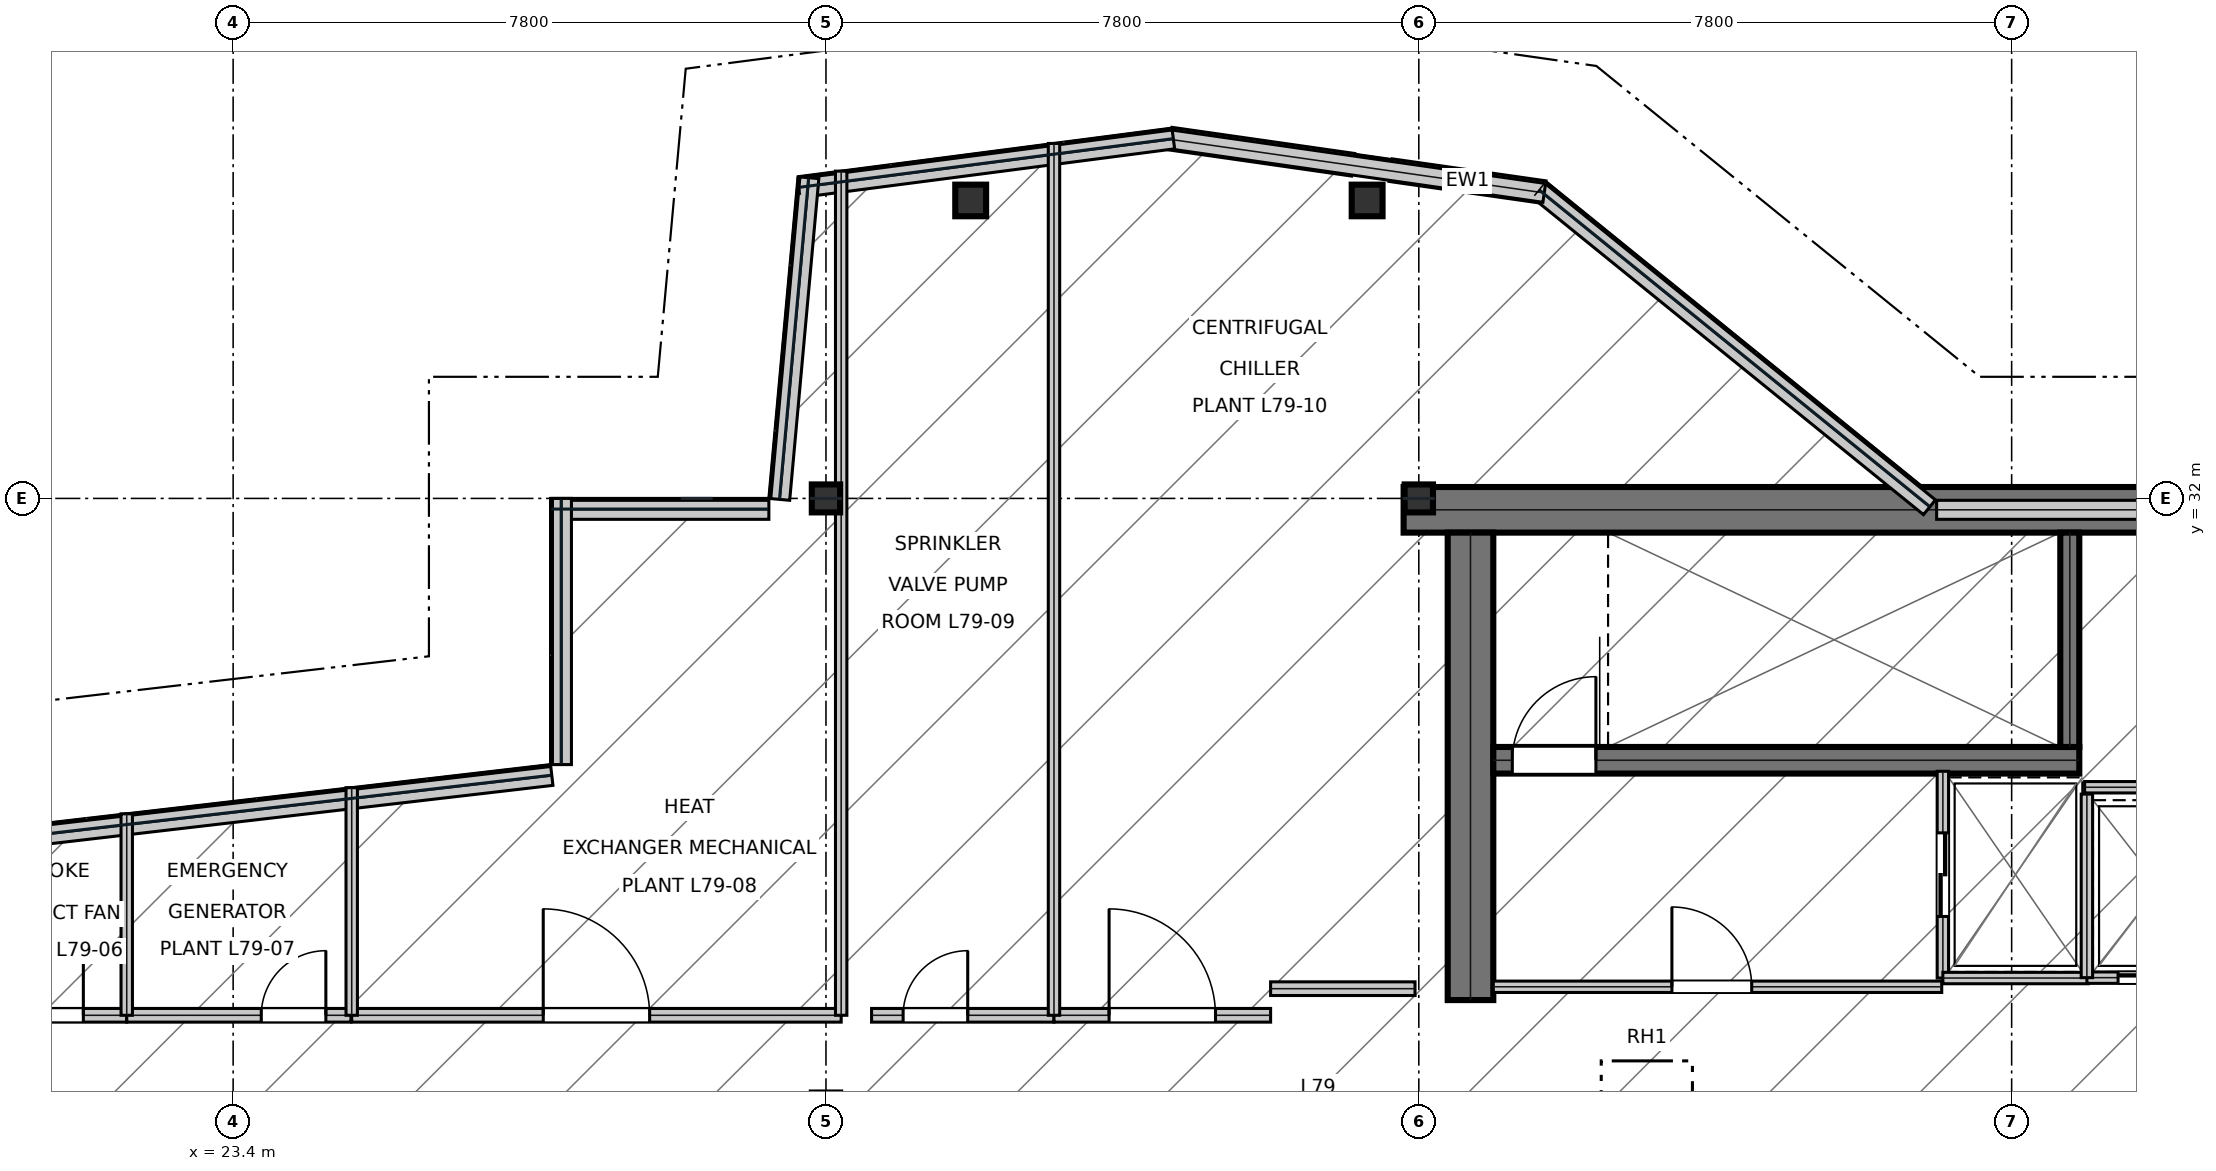
"""IFC4 building model, lengths in metres.
Left out: names, types, materials, properties, quantities, classifications, styles, units other than length and angle.
Written with IfcOpenShell. Run it as: python <this file> out.ifc"""

import sys

from ifc_helpers import new_model, si_unit, direction, frame, frame_2d, origin, origin_2d, place, context, subcontext, project, spatial, rectangle, i_section, extrude, element, fill, save


model = new_model("IFC4")
c1 = context("Model", 3, precision=1e-05, world=origin(), true_north=direction((0.0, 1.0)))
c2 = subcontext(c1, "Body", "Model", "MODEL_VIEW")
j1 = project(units=[si_unit("LENGTHUNIT", "METRE"), si_unit("PLANEANGLEUNIT", "RADIAN")], contexts=[c1])
p1 = place(None, origin())
s1 = spatial("IfcSite", under=j1, at=p1, CompositionType="ELEMENT")
p2 = place(p1, origin())
s2 = spatial("IfcBuilding", under=s1, at=p2, CompositionType="ELEMENT")
p3 = place(p2, frame((0.0, 0.0, 336.9)))
s3 = spatial("IfcBuildingStorey", under=s2, at=p3, CompositionType="ELEMENT", Elevation=336.9)
p4 = place(p3, frame((38.8, 31.85, 0.0), z_axis=(0.0, 0.0, 1.0), x_axis=(1.0, 0.0, 0.0)))
e1 = element("IfcWall", 1, at=p4, inside=s3, PredefinedType="SHEAR", context=c2, shape_type="SweptSolid", body=[
    extrude(rectangle(XDim=16.0, YDim=0.6, at=frame_2d((8.0, 0.0))), origin(), (0.0, 0.0, 1.0), 4.22),
])
p5 = place(p3, frame((39.68, 25.4, 0.0), z_axis=(0.0, 0.0, 1.0), x_axis=(0.0, 1.0, 0.0)))
e2 = element("IfcWall", 2, at=p5, inside=s3, PredefinedType="SHEAR", context=c2, shape_type="SweptSolid", body=[
    extrude(rectangle(XDim=6.15, YDim=0.6, at=frame_2d((3.075, 0.0))), origin(), (0.0, 0.0, 1.0), 4.22),
])
p6 = place(p3, frame((39.98, 28.555, 0.0), z_axis=(0.0, 0.0, 1.0), x_axis=(1.0, 0.0, 0.0)))
e3 = element("IfcWall", 3, at=p6, inside=s3, PredefinedType="SHEAR", context=c2, shape_type="SweptSolid", body=[
    extrude(rectangle(XDim=7.71, YDim=0.35, at=frame_2d((3.855, 0.0))), origin(), (0.0, 0.0, 1.0), 4.22),
])
p7 = place(p6, frame((0.25, 0.0, 0.0)))
e4 = element("IfcOpeningElement", 4, at=p7, cuts=e3, PredefinedType="OPENING", context=c2, shape_type="SweptSolid", body=[
    extrude(rectangle(XDim=1.1, YDim=2.15, at=frame_2d((0.55, 1.075))), frame((0.0, 0.185, 0.0), z_axis=(0.0, -1.0, 0.0), x_axis=(1.0, 0.0, 0.0)), (0.0, 0.0, 1.0), 0.37),
])
p8 = place(p3, frame((47.565, 28.73, 0.0), z_axis=(0.0, 0.0, 1.0), x_axis=(0.0, 1.0, 0.0)))
e5 = element("IfcWall", 5, at=p8, inside=s3, PredefinedType="SHEAR", context=c2, shape_type="SweptSolid", body=[
    extrude(rectangle(XDim=2.82, YDim=0.25, at=frame_2d((1.41, 0.0))), origin(), (0.0, 0.0, 1.0), 4.22),
])
for number, where, z_axis, x_axis in (
    (6, (31.2, 32.0, 0.0), (0.0, 0.0, 1.0), (1.0, 0.0, 0.0)),
    (7, (39.0, 32.0, 0.0), (0.0, 0.0, 1.0), (1.0, 0.0, 0.0)),
):
    element("IfcColumn", number, at=place(p3, frame(where, z_axis=z_axis, x_axis=x_axis)), inside=s3, PredefinedType="COLUMN", context=c2, shape_type="SweptSolid", body=[
        extrude(i_section(OverallWidth=0.373, OverallDepth=0.368, WebThickness=0.015, FlangeThickness=0.024, at=origin_2d()), origin(), (0.0, 0.0, 1.0), 4.444),
    ])
for number, where, z_axis, x_axis in (
    (8, (33.104, 35.92, 0.016), (0.0, 0.0, 1.0), (1.0, 0.0, 0.0)),
    (9, (38.32, 35.92, 0.016), (0.0, 0.0, 1.0), (1.0, 0.0, 0.0)),
):
    element("IfcColumn", number, at=place(p3, frame(where, z_axis=z_axis, x_axis=x_axis)), inside=s3, PredefinedType="COLUMN", context=c2, shape_type="SweptSolid", body=[
        extrude(i_section(OverallWidth=0.406, OverallDepth=0.416, WebThickness=0.03, FlangeThickness=0.048, at=origin_2d()), origin(), (0.0, 0.0, 1.0), 4.418),
    ])
p9 = place(p3, frame((40.652, 36.029, 0.0), z_axis=(0.0, 0.0, 1.0), x_axis=(-0.989904067126, 0.141738978007, 0.0)))
e10 = element("IfcWall", 10, at=p9, inside=s3, PredefinedType="STANDARD", context=c2, shape_type="SweptSolid", body=[
    extrude(rectangle(XDim=2.045, YDim=0.3, at=frame_2d((1.022, 0.0))), origin(), (0.0, 0.0, 1.0), 4.17),
])
p10 = place(p3, frame((38.136, 36.389, 0.0), z_axis=(0.0, 0.0, 1.0), x_axis=(-0.989917298502, 0.141646539412, 0.0)))
e11 = element("IfcWall", 11, at=p10, inside=s3, PredefinedType="STANDARD", context=c2, shape_type="SweptSolid", body=[
    extrude(rectangle(XDim=2.428, YDim=0.3, at=frame_2d((1.214, 0.0))), origin(), (0.0, 0.0, 1.0), 4.17),
])
p11 = place(p3, frame((54.6, 31.85, 4.45), z_axis=(0.0, 0.0, 1.0), x_axis=(-1.0, 0.0, 0.0)))
e12 = element("IfcWall", 12, at=p11, inside=s3, PredefinedType="PARAPET", context=c2, shape_type="SweptSolid", body=[
    extrude(rectangle(XDim=8.787, YDim=0.25, at=frame_2d((4.394, 0.0))), origin(), (0.0, 0.0, 1.0), 1.1),
])
p12 = place(p3, frame((45.719, 31.884, 4.45), z_axis=(0.0, 0.0, 1.0), x_axis=(-0.77680744345, 0.629738196238, 0.0)))
e13 = element("IfcWall", 13, at=p12, inside=s3, PredefinedType="PARAPET", context=c2, shape_type="SweptSolid", body=[
    extrude(rectangle(XDim=6.619, YDim=0.25, at=frame_2d((3.309, 0.0))), origin(), (0.0, 0.0, 1.0), 1.1),
])
p13 = place(p3, frame((40.65, 36.02, 4.45), z_axis=(0.0, 0.0, 1.0), x_axis=(-0.989919997097, 0.141627678608, 0.0)))
e14 = element("IfcWall", 14, at=p13, inside=s3, PredefinedType="PARAPET", context=c2, shape_type="SweptSolid", body=[
    extrude(rectangle(XDim=4.97, YDim=0.25, at=frame_2d((2.485, 0.0))), origin(), (0.0, 0.0, 1.0), 1.1),
])
p14 = place(p3, frame((35.771, 36.723, 4.45), z_axis=(0.0, 0.0, 1.0), x_axis=(-0.991640700932, -0.129029919996, 0.0)))
e15 = element("IfcWall", 15, at=p14, inside=s3, PredefinedType="PARAPET", context=c2, shape_type="SweptSolid", body=[
    extrude(rectangle(XDim=4.961, YDim=0.25, at=frame_2d((2.48, 0.0))), origin(), (0.0, 0.0, 1.0), 1.1),
])
p15 = place(p3, frame((30.982, 36.219, 4.45), z_axis=(0.0, 0.0, 1.0), x_axis=(-0.090318171013, -0.995912962053, 0.0)))
e16 = element("IfcWall", 16, at=p15, inside=s3, PredefinedType="PARAPET", context=c2, shape_type="SweptSolid", body=[
    extrude(rectangle(XDim=4.249, YDim=0.25, at=frame_2d((2.125, 0.0))), origin(), (0.0, 0.0, 1.0), 1.1),
])
p16 = place(p3, frame((30.448, 31.85, 4.45), z_axis=(0.0, 0.0, 1.0), x_axis=(-1.0, 0.0, 0.0)))
e17 = element("IfcWall", 17, at=p16, inside=s3, PredefinedType="PARAPET", context=c2, shape_type="SweptSolid", body=[
    extrude(rectangle(XDim=2.873, YDim=0.25, at=frame_2d((1.436, 0.0))), origin(), (0.0, 0.0, 1.0), 1.1),
])
p17 = place(p3, frame((27.726, 32.0, 4.45), z_axis=(0.0, 0.0, 1.0), x_axis=(0.0, -1.0, 0.0)))
e18 = element("IfcWall", 18, at=p17, inside=s3, PredefinedType="PARAPET", context=c2, shape_type="SweptSolid", body=[
    extrude(rectangle(XDim=3.502, YDim=0.25, at=frame_2d((1.751, 0.0))), origin(), (0.0, 0.0, 1.0), 1.1),
])
p18 = place(p3, frame((27.593, 28.349, 4.45), z_axis=(0.0, 0.0, 1.0), x_axis=(-0.993323430456, -0.115362743148, 0.0)))
e19 = element("IfcWall", 19, at=p18, inside=s3, PredefinedType="PARAPET", context=c2, shape_type="SweptSolid", body=[
    extrude(rectangle(XDim=7.828, YDim=0.25, at=frame_2d((3.914, 0.0))), origin(), (0.0, 0.0, 1.0), 1.1),
])
p19 = place(p3, frame((39.98, 25.575, 0.0), z_axis=(0.0, 0.0, 1.0), x_axis=(1.0, 0.0, 0.0)))
e20 = element("IfcWall", 20, at=p19, inside=s3, PredefinedType="PARTITIONING", context=c2, shape_type="SweptSolid", body=[
    extrude(rectangle(XDim=5.9, YDim=0.15, at=frame_2d((2.95, 0.0))), origin(), (0.0, 0.0, 1.0), 4.22),
])
p20 = place(p19, frame((2.35, 0.0, 0.0)))
e21 = element("IfcOpeningElement", 21, at=p20, cuts=e20, PredefinedType="OPENING", context=c2, shape_type="SweptSolid", body=[
    extrude(rectangle(XDim=1.05, YDim=2.15, at=frame_2d((0.525, 1.075))), frame((0.0, 0.085, 0.0), z_axis=(0.0, -1.0, 0.0), x_axis=(1.0, 0.0, 0.0)), (0.0, 0.0, 1.0), 0.17),
])
p21 = place(p3, frame((45.895, 25.69, 0.0), z_axis=(0.0, 0.0, 1.0), x_axis=(0.0, 1.0, 0.0)))
e22 = element("IfcWall", 22, at=p21, inside=s3, PredefinedType="PARTITIONING", context=c2, shape_type="SweptSolid", body=[
    extrude(rectangle(XDim=2.72, YDim=0.15, at=frame_2d((1.36, 0.0))), origin(), (0.0, 0.0, 1.0), 4.22),
])
p22 = place(p21, frame((0.81, 0.0, 0.0)))
e23 = element("IfcOpeningElement", 23, at=p22, cuts=e22, PredefinedType="OPENING", context=c2, shape_type="SweptSolid", body=[
    extrude(rectangle(XDim=1.1, YDim=2.15, at=frame_2d((0.55, 1.075))), frame((0.0, 0.085, 0.0), z_axis=(0.0, -1.0, 0.0), x_axis=(1.0, 0.0, 0.0)), (0.0, 0.0, 1.0), 0.17),
])
p23 = place(p3, frame((45.895, 25.69, 0.0), z_axis=(0.0, 0.0, 1.0), x_axis=(1.0, 0.0, 0.0)))
e24 = element("IfcWall", 24, at=p23, inside=s3, PredefinedType="PARTITIONING", context=c2, shape_type="SweptSolid", body=[
    extrude(rectangle(XDim=1.915, YDim=0.15, at=frame_2d((0.958, 0.0))), origin(), (0.0, 0.0, 1.0), 4.22),
])
p24 = place(p3, frame((47.79, 25.695, 0.0), z_axis=(0.0, 0.0, 1.0), x_axis=(1.0, 0.0, 0.0)))
e25 = element("IfcWall", 25, at=p24, inside=s3, PredefinedType="PARTITIONING", context=c2, shape_type="SweptSolid", body=[
    extrude(rectangle(XDim=1.92, YDim=0.15, at=frame_2d((0.96, 0.0))), origin(), (0.0, 0.0, 1.0), 4.22),
])
p25 = place(p24, frame((0.41, 0.0, 0.0)))
e26 = element("IfcOpeningElement", 26, at=p25, cuts=e25, PredefinedType="OPENING", context=c2, shape_type="SweptSolid", body=[
    extrude(rectangle(XDim=1.1, YDim=2.15, at=frame_2d((0.55, 1.075))), frame((0.0, 0.085, 0.0), z_axis=(0.0, -1.0, 0.0), x_axis=(1.0, 0.0, 0.0)), (0.0, 0.0, 1.0), 0.17),
])
p26 = place(p3, frame((47.79, 25.695, 0.0), z_axis=(0.0, 0.0, 1.0), x_axis=(0.0, 1.0, 0.0)))
e27 = element("IfcWall", 27, at=p26, inside=s3, PredefinedType="PARTITIONING", context=c2, shape_type="SweptSolid", body=[
    extrude(rectangle(XDim=2.415, YDim=0.15, at=frame_2d((1.208, 0.0))), origin(), (0.0, 0.0, 1.0), 4.22),
])
p27 = place(p3, frame((47.76, 28.2, 0.0), z_axis=(0.0, 0.0, 1.0), x_axis=(1.0, 0.0, 0.0)))
e28 = element("IfcWall", 28, at=p27, inside=s3, PredefinedType="PARTITIONING", context=c2, shape_type="SweptSolid", body=[
    extrude(rectangle(XDim=2.04, YDim=0.15, at=frame_2d((1.02, 0.0))), origin(), (0.0, 0.0, 1.0), 4.22),
])
p28 = place(p3, frame((19.288, 25.2, 0.0), z_axis=(0.0, 0.0, 1.0), x_axis=(1.0, 0.0, 0.0)))
e29 = element("IfcWall", 29, at=p28, inside=s3, PredefinedType="SOLIDWALL", context=c2, shape_type="SweptSolid", body=[
    extrude(rectangle(XDim=2.712, YDim=0.18, at=frame_2d((1.356, 0.0))), origin(), (0.0, 0.0, 1.0), 4.22),
])
p29 = place(p28, frame((1.291, 0.0, 0.0)))
e30 = element("IfcOpeningElement", 30, at=p29, cuts=e29, PredefinedType="OPENING", context=c2, shape_type="SweptSolid", body=[
    extrude(rectangle(XDim=0.85, YDim=2.15, at=frame_2d((0.425, 1.075))), frame((0.0, 0.1, 0.0), z_axis=(0.0, -1.0, 0.0), x_axis=(1.0, 0.0, 0.0)), (0.0, 0.0, 1.0), 0.2),
])
p30 = place(p3, frame((22.0, 25.2, 0.0), z_axis=(0.0, 0.0, 1.0), x_axis=(1.0, 0.0, 0.0)))
e31 = element("IfcWall", 31, at=p30, inside=s3, PredefinedType="SOLIDWALL", context=c2, shape_type="SweptSolid", body=[
    extrude(rectangle(XDim=2.95, YDim=0.18, at=frame_2d((1.475, 0.0))), origin(), (0.0, 0.0, 1.0), 3.63),
])
p31 = place(p30, frame((1.77, 0.0, 0.0)))
e32 = element("IfcOpeningElement", 32, at=p31, cuts=e31, PredefinedType="OPENING", context=c2, shape_type="SweptSolid", body=[
    extrude(rectangle(XDim=0.85, YDim=2.15, at=frame_2d((0.425, 1.075))), frame((0.0, 0.1, 0.0), z_axis=(0.0, -1.0, 0.0), x_axis=(1.0, 0.0, 0.0)), (0.0, 0.0, 1.0), 0.2),
])
p32 = place(p3, frame((24.96, 25.2, 0.0), z_axis=(0.0, 0.0, 1.0), x_axis=(1.0, 0.0, 0.0)))
e33 = element("IfcWall", 33, at=p32, inside=s3, PredefinedType="SOLIDWALL", context=c2, shape_type="SweptSolid", body=[
    extrude(rectangle(XDim=6.44, YDim=0.18, at=frame_2d((3.22, 0.0))), origin(), (0.0, 0.0, 1.0), 3.63),
])
p33 = place(p32, frame((2.52, 0.0, 0.0)))
e34 = element("IfcOpeningElement", 34, at=p33, cuts=e33, PredefinedType="OPENING", context=c2, shape_type="SweptSolid", body=[
    extrude(rectangle(XDim=1.4, YDim=2.2, at=frame_2d((0.7, 1.1))), frame((0.0, 0.1, 0.0), z_axis=(0.0, -1.0, 0.0), x_axis=(1.0, 0.0, 0.0)), (0.0, 0.0, 1.0), 0.2),
])
p34 = place(p3, frame((31.8, 25.2, 0.0), z_axis=(0.0, 0.0, 1.0), x_axis=(1.0, 0.0, 0.0)))
e35 = element("IfcWall", 35, at=p34, inside=s3, PredefinedType="SOLIDWALL", context=c2, shape_type="SweptSolid", body=[
    extrude(rectangle(XDim=2.4, YDim=0.18, at=frame_2d((1.2, 0.0))), origin(), (0.0, 0.0, 1.0), 4.22),
])
p35 = place(p34, frame((0.415, 0.0, 0.0)))
e36 = element("IfcOpeningElement", 36, at=p35, cuts=e35, PredefinedType="OPENING", context=c2, shape_type="SweptSolid", body=[
    extrude(rectangle(XDim=0.85, YDim=2.15, at=frame_2d((0.425, 1.075))), frame((0.0, 0.1, 0.0), z_axis=(0.0, -1.0, 0.0), x_axis=(1.0, 0.0, 0.0)), (0.0, 0.0, 1.0), 0.2),
])
p36 = place(p3, frame((34.2, 25.2, 0.0), z_axis=(0.0, 0.0, 1.0), x_axis=(1.0, 0.0, 0.0)))
e37 = element("IfcWall", 37, at=p36, inside=s3, PredefinedType="SOLIDWALL", context=c2, shape_type="SweptSolid", body=[
    extrude(rectangle(XDim=2.85, YDim=0.18, at=frame_2d((1.425, 0.0))), origin(), (0.0, 0.0, 1.0), 4.22),
])
p37 = place(p36, frame((0.725, 0.0, 0.0)))
e38 = element("IfcOpeningElement", 38, at=p37, cuts=e37, PredefinedType="OPENING", context=c2, shape_type="SweptSolid", body=[
    extrude(rectangle(XDim=1.4, YDim=2.2, at=frame_2d((0.7, 1.1))), frame((0.0, 0.1, 0.0), z_axis=(0.0, -1.0, 0.0), x_axis=(1.0, 0.0, 0.0)), (0.0, 0.0, 1.0), 0.2),
])
p38 = place(p3, frame((37.05, 25.55, 0.0), z_axis=(0.0, 0.0, 1.0), x_axis=(1.0, 0.0, 0.0)))
e39 = element("IfcWall", 39, at=p38, inside=s3, PredefinedType="SOLIDWALL", context=c2, shape_type="SweptSolid", body=[
    extrude(rectangle(XDim=1.9, YDim=0.18, at=frame_2d((0.95, 0.0))), origin(), (0.0, 0.0, 1.0), 4.22),
])
p39 = place(p3, frame((22.0, 25.2, 0.0), z_axis=(0.0, 0.0, 1.0), x_axis=(0.0, 1.0, 0.0)))
e40 = element("IfcWall", 40, at=p39, inside=s3, PredefinedType="MOVABLE", context=c2, shape_type="SweptSolid", body=[
    extrude(rectangle(XDim=2.651, YDim=0.15, at=frame_2d((1.325, 0.0))), origin(), (0.0, 0.0, 1.0), 3.63),
])
p40 = place(p3, frame((24.96, 25.2, 0.0), z_axis=(0.0, 0.0, 1.0), x_axis=(0.0, 1.0, 0.0)))
e41 = element("IfcWall", 41, at=p40, inside=s3, PredefinedType="MOVABLE", context=c2, shape_type="SweptSolid", body=[
    extrude(rectangle(XDim=2.994, YDim=0.15, at=frame_2d((1.497, 0.0))), origin(), (0.0, 0.0, 1.0), 3.63),
])
p41 = place(p3, frame((31.4, 25.2, 0.0), z_axis=(0.0, 0.0, 1.0), x_axis=(0.0, 1.0, 0.0)))
e42 = element("IfcWall", 42, at=p41, inside=s3, PredefinedType="MOVABLE", context=c2, shape_type="SweptSolid", body=[
    extrude(rectangle(XDim=11.106, YDim=0.15, at=frame_2d((5.553, 0.0))), origin(), (0.0, 0.0, 1.0), 3.63),
])
p42 = place(p3, frame((34.2, 25.2, 0.0), z_axis=(0.0, 0.0, 1.0), x_axis=(0.0, 1.0, 0.0)))
e43 = element("IfcWall", 43, at=p42, inside=s3, PredefinedType="MOVABLE", context=c2, shape_type="SweptSolid", body=[
    extrude(rectangle(XDim=11.47, YDim=0.15, at=frame_2d((5.735, 0.0))), origin(), (0.0, 0.0, 1.0), 3.63),
])
p43 = place(p3, frame((0.0, 0.0, 4.17)))
p44 = place(p43, frame((42.0, 24.0, 0.23)))
e44 = element("IfcWindow", 44, at=p44, inside=s3, PartitioningType="SINGLE_PANEL", PredefinedType="SKYLIGHT", context=c2, shape_type="SweptSolid", body=[
    extrude(rectangle(XDim=1.2, YDim=1.2, at=origin_2d()), origin(), (0.0, 0.0, 1.0), 0.05),
])
p45 = place(p20, origin())
e45 = element("IfcDoor", 45, at=p45, inside=s3, OperationType="SINGLE_SWING_LEFT", PredefinedType="DOOR", context=c2, shape_type="SweptSolid", body=[
    extrude(rectangle(XDim=1.05, YDim=2.15, at=frame_2d((0.525, 1.075))), frame((0.0, 0.025, 0.0), z_axis=(0.0, -1.0, 0.0), x_axis=(1.0, 0.0, 0.0)), (0.0, 0.0, 1.0), 0.05),
])
fill(e21, e45)
p46 = place(p22, frame((1.1, 0.0, 0.0), z_axis=(0.0, 0.0, 1.0), x_axis=(-1.0, 0.0, 0.0)))
e46 = element("IfcDoor", 46, at=p46, inside=s3, OperationType="DOUBLE_DOOR_SLIDING", PredefinedType="DOOR", context=c2, shape_type="SweptSolid", body=[
    extrude(rectangle(XDim=1.1, YDim=2.15, at=frame_2d((0.55, 1.075))), frame((0.0, 0.025, 0.0), z_axis=(0.0, -1.0, 0.0), x_axis=(1.0, 0.0, 0.0)), (0.0, 0.0, 1.0), 0.05),
])
fill(e23, e46)
p47 = place(p25, frame((1.1, 0.0, 0.0), z_axis=(0.0, 0.0, 1.0), x_axis=(-1.0, 0.0, 0.0)))
e47 = element("IfcDoor", 47, at=p47, inside=s3, OperationType="DOUBLE_DOOR_SLIDING", PredefinedType="DOOR", context=c2, shape_type="SweptSolid", body=[
    extrude(rectangle(XDim=1.1, YDim=2.15, at=frame_2d((0.55, 1.075))), frame((0.0, 0.025, 0.0), z_axis=(0.0, -1.0, 0.0), x_axis=(1.0, 0.0, 0.0)), (0.0, 0.0, 1.0), 0.05),
])
fill(e26, e47)
p48 = place(p29, origin())
e48 = element("IfcDoor", 48, at=p48, inside=s3, OperationType="SINGLE_SWING_RIGHT", PredefinedType="DOOR", context=c2, shape_type="SweptSolid", body=[
    extrude(rectangle(XDim=0.85, YDim=2.15, at=frame_2d((0.425, 1.075))), frame((0.0, 0.025, 0.0), z_axis=(0.0, -1.0, 0.0), x_axis=(1.0, 0.0, 0.0)), (0.0, 0.0, 1.0), 0.05),
])
fill(e30, e48)
p49 = place(p31, origin())
e49 = element("IfcDoor", 49, at=p49, inside=s3, OperationType="SINGLE_SWING_RIGHT", PredefinedType="DOOR", context=c2, shape_type="SweptSolid", body=[
    extrude(rectangle(XDim=0.85, YDim=2.15, at=frame_2d((0.425, 1.075))), frame((0.0, 0.025, 0.0), z_axis=(0.0, -1.0, 0.0), x_axis=(1.0, 0.0, 0.0)), (0.0, 0.0, 1.0), 0.05),
])
fill(e32, e49)
p50 = place(p33, origin())
e50 = element("IfcDoor", 50, at=p50, inside=s3, OperationType="SINGLE_SWING_LEFT", PredefinedType="DOOR", context=c2, shape_type="SweptSolid", body=[
    extrude(rectangle(XDim=1.4, YDim=2.2, at=frame_2d((0.7, 1.1))), frame((0.0, 0.025, 0.0), z_axis=(0.0, -1.0, 0.0), x_axis=(1.0, 0.0, 0.0)), (0.0, 0.0, 1.0), 0.05),
])
fill(e34, e50)
p51 = place(p35, origin())
e51 = element("IfcDoor", 51, at=p51, inside=s3, OperationType="SINGLE_SWING_RIGHT", PredefinedType="DOOR", context=c2, shape_type="SweptSolid", body=[
    extrude(rectangle(XDim=0.85, YDim=2.15, at=frame_2d((0.425, 1.075))), frame((0.0, 0.025, 0.0), z_axis=(0.0, -1.0, 0.0), x_axis=(1.0, 0.0, 0.0)), (0.0, 0.0, 1.0), 0.05),
])
fill(e36, e51)
p52 = place(p37, origin())
e52 = element("IfcDoor", 52, at=p52, inside=s3, OperationType="SINGLE_SWING_LEFT", PredefinedType="DOOR", context=c2, shape_type="SweptSolid", body=[
    extrude(rectangle(XDim=1.4, YDim=2.2, at=frame_2d((0.7, 1.1))), frame((0.0, 0.025, 0.0), z_axis=(0.0, -1.0, 0.0), x_axis=(1.0, 0.0, 0.0)), (0.0, 0.0, 1.0), 0.05),
])
fill(e38, e52)
p53 = place(p7, origin())
e53 = element("IfcDoor", 53, at=p53, inside=s3, OperationType="SINGLE_SWING_RIGHT", PredefinedType="DOOR", context=c2, shape_type="SweptSolid", body=[
    extrude(rectangle(XDim=1.1, YDim=2.15, at=frame_2d((0.55, 1.075))), frame((0.0, 0.025, 0.0), z_axis=(0.0, -1.0, 0.0), x_axis=(1.0, 0.0, 0.0)), (0.0, 0.0, 1.0), 0.05),
])
fill(e4, e53)
save(model, sys.argv[1])
